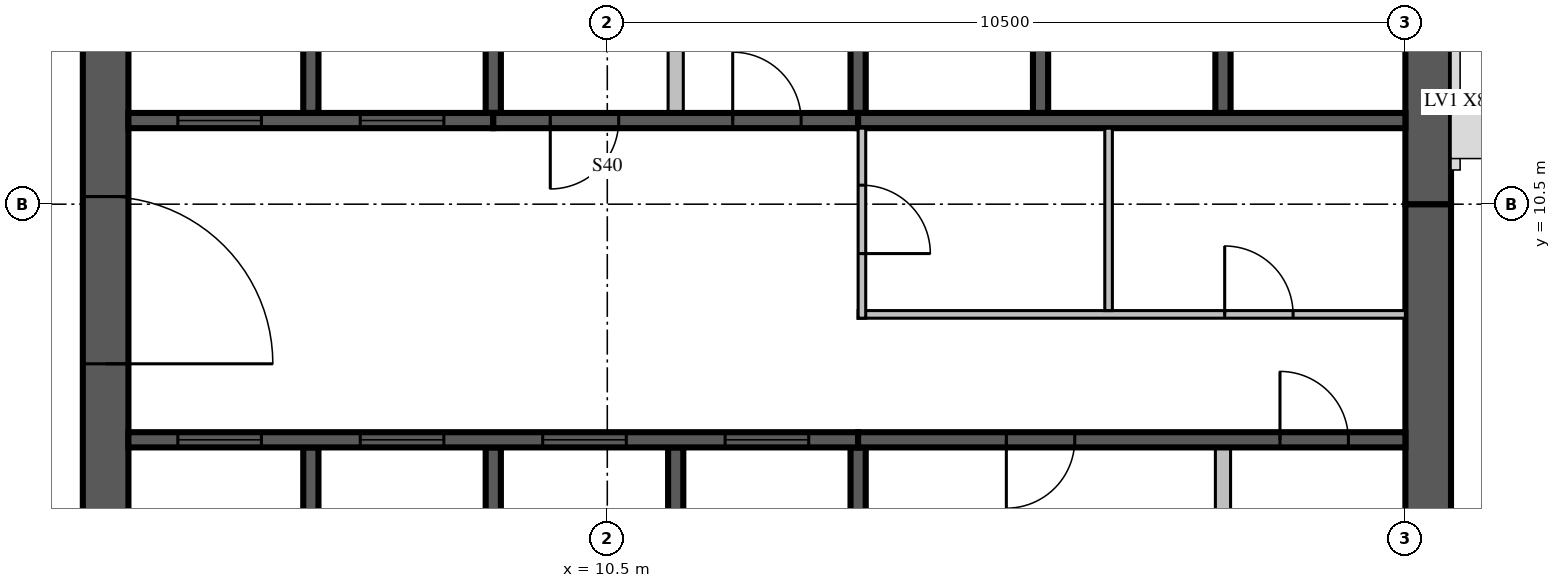
"""IFC4 building model, lengths in metres.
Left out: names, types, materials, properties, quantities, classifications, styles, units other than length and angle.
Written with IfcOpenShell. Run it as: python <this file> out.ifc"""

import sys

from ifc_helpers import new_model, si_unit, direction, frame, frame_2d, origin, place, context, subcontext, project, spatial, rectangle, extrude, source, transform, mapped, element, fill, save


model = new_model("IFC4")
c1 = context("Model", 3, precision=1e-05, world=origin(), true_north=direction((0.0, 1.0)))
c2 = subcontext(c1, "Body", "Model", "MODEL_VIEW")
j1 = project(units=[si_unit("LENGTHUNIT", "METRE"), si_unit("PLANEANGLEUNIT", "RADIAN")], contexts=[c1])
p1 = place(None, origin())
s1 = spatial("IfcSite", under=j1, at=p1, CompositionType="ELEMENT")
p2 = place(p1, origin())
s2 = spatial("IfcBuilding", under=s1, at=p2, CompositionType="ELEMENT")
p3 = place(p2, frame((0.0, 0.0, 298.5)))
s3 = spatial("IfcBuildingStorey", under=s2, at=p3, CompositionType="ELEMENT", Elevation=298.5)
m1 = source(origin(), c2, "Body", "SweptSolid", [
    extrude(rectangle(XDim=17.4, YDim=0.6, at=frame_2d((8.7, 0.0))), origin(), (0.0, 0.0, 1.0), 3.5),
])
p4 = place(p3, frame((3.9, 4.2, 0.0), z_axis=(0.0, 0.0, 1.0), x_axis=(0.0, 1.0, 0.0)))
e1 = element("IfcWall", 1, at=p4, inside=s3, PredefinedType="SHEAR", context=c2, shape_type="MappedRepresentation", body=[
    mapped(m1, transform((0.0, 0.0, 0.0), scale=1.0)),
])
m2 = source(origin(), c2, "Body", "SweptSolid", [
    extrude(rectangle(XDim=2.2, YDim=2.1, at=frame_2d((1.1, 1.05))), frame((0.0, 0.31, 0.0), z_axis=(0.0, -1.0, 0.0), x_axis=(1.0, 0.0, 0.0)), (0.0, 0.0, 1.0), 0.62),
])
p5 = place(p4, frame((4.2, 0.0, 0.0)))
e2 = element("IfcOpeningElement", 2, at=p5, cuts=e1, PredefinedType="OPENING", context=c2, shape_type="MappedRepresentation", body=[
    mapped(m2, transform((0.0, 0.0, 0.0), scale=1.0)),
])
m3 = source(origin(), c2, "Body", "SweptSolid", [
    extrude(rectangle(XDim=0.9, YDim=2.1, at=frame_2d((0.45, 1.05))), frame((0.0, 0.31, 0.0), z_axis=(0.0, -1.0, 0.0), x_axis=(1.0, 0.0, 0.0)), (0.0, 0.0, 1.0), 0.62),
])
p6 = place(p4, frame((10.95, 0.0, 0.0)))
e3 = element("IfcOpeningElement", 3, at=p6, cuts=e1, PredefinedType="OPENING", context=c2, shape_type="MappedRepresentation", body=[
    mapped(m3, transform((0.0, 0.0, 0.0), scale=1.0)),
])
m4 = source(origin(), c2, "Body", "SweptSolid", [
    extrude(rectangle(XDim=6.3, YDim=0.6, at=frame_2d((3.15, 0.0))), origin(), (0.0, 0.0, 1.0), 3.5),
])
p7 = place(p3, frame((21.3, 4.2, 0.0), z_axis=(0.0, 0.0, 1.0), x_axis=(0.0, 1.0, 0.0)))
e4 = element("IfcWall", 4, at=p7, inside=s3, PredefinedType="SHEAR", context=c2, shape_type="MappedRepresentation", body=[
    mapped(m4, transform((0.0, 0.0, 0.0), scale=1.0)),
])
m5 = source(origin(), c2, "Body", "SweptSolid", [
    extrude(rectangle(XDim=10.5, YDim=0.6, at=frame_2d((5.25, 0.0))), origin(), (0.0, 0.0, 1.0), 3.5),
])
p8 = place(p3, frame((21.3, 10.5, 0.0), z_axis=(0.0, 0.0, 1.0), x_axis=(0.0, 1.0, 0.0)))
e5 = element("IfcWall", 5, at=p8, inside=s3, PredefinedType="SHEAR", context=c2, shape_type="MappedRepresentation", body=[
    mapped(m5, transform((0.0, 0.0, 0.0), scale=1.0)),
])
m6 = source(origin(), c2, "Body", "SweptSolid", [
    extrude(rectangle(XDim=1.2, YDim=2.4, at=frame_2d((0.6, 1.2))), frame((0.0, 0.31, 0.0), z_axis=(0.0, -1.0, 0.0), x_axis=(1.0, 0.0, 0.0)), (0.0, 0.0, 1.0), 0.62),
])
p9 = place(p8, frame((5.7, 0.0, 0.6)))
e6 = element("IfcOpeningElement", 6, at=p9, cuts=e5, PredefinedType="OPENING", context=c2, shape_type="MappedRepresentation", body=[
    mapped(m6, transform((0.0, 0.0, 0.0), scale=1.0)),
])
m7 = source(origin(), c2, "Body", "SweptSolid", [
    extrude(rectangle(XDim=3.1, YDim=0.2, at=frame_2d((1.55, 0.0))), origin(), (0.0, 0.0, 1.0), 3.5),
])
for number, where, z_axis, x_axis in (
    (7, (6.6, 4.2, 0.0), (0.0, 0.0, 1.0), (0.0, 1.0, 0.0)),
    (8, (9.0, 4.2, 0.0), (0.0, 0.0, 1.0), (0.0, 1.0, 0.0)),
    (9, (11.4, 4.2, 0.0), (0.0, 0.0, 1.0), (0.0, 1.0, 0.0)),
):
    element("IfcWall", number, at=place(p3, frame(where, z_axis=z_axis, x_axis=x_axis)), inside=s3, PredefinedType="SOLIDWALL", context=c2, shape_type="MappedRepresentation", body=[
        mapped(m7, transform((0.0, 0.0, 0.0), scale=1.0)),
    ])
m8 = source(origin(), c2, "Body", "SweptSolid", [
    extrude(rectangle(XDim=3.1, YDim=0.2, at=frame_2d((1.55, 0.0))), origin(), (0.0, 0.0, 1.0), 3.1),
])
p10 = place(p3, frame((13.8, 4.2, 0.0), z_axis=(0.0, 0.0, 1.0), x_axis=(0.0, 1.0, 0.0)))
e10 = element("IfcWall", 10, at=p10, inside=s3, PredefinedType="SOLIDWALL", context=c2, shape_type="MappedRepresentation", body=[
    mapped(m8, transform((0.0, 0.0, 0.0), scale=1.0)),
])
m9 = source(origin(), c2, "Body", "SweptSolid", [
    extrude(rectangle(XDim=3.1, YDim=0.2, at=frame_2d((1.55, 0.0))), origin(), (0.0, 0.0, 1.0), 3.1),
])
p11 = place(p3, frame((18.6, 4.2, 0.0), z_axis=(0.0, 0.0, 1.0), x_axis=(0.0, 1.0, 0.0)))
e11 = element("IfcWall", 11, at=p11, inside=s3, PredefinedType="PARTITIONING", context=c2, shape_type="MappedRepresentation", body=[
    mapped(m9, transform((0.0, 0.0, 0.0), scale=1.0)),
])
m10 = source(origin(), c2, "Body", "SweptSolid", [
    extrude(rectangle(XDim=3.0, YDim=0.2, at=frame_2d((1.5, 0.0))), origin(), (0.0, 0.0, 1.0), 3.5),
])
p12 = place(p3, frame((6.6, 11.7, 0.0), z_axis=(0.0, 0.0, 1.0), x_axis=(0.0, 1.0, 0.0)))
e12 = element("IfcWall", 12, at=p12, inside=s3, PredefinedType="SOLIDWALL", context=c2, shape_type="MappedRepresentation", body=[
    mapped(m10, transform((0.0, 0.0, 0.0), scale=1.0)),
])
m11 = source(origin(), c2, "Body", "SweptSolid", [
    extrude(rectangle(XDim=3.0, YDim=0.2, at=frame_2d((1.5, 0.0))), origin(), (0.0, 0.0, 1.0), 3.1),
])
for number, where, z_axis, x_axis in (
    (13, (9.0, 11.7, 0.0), (0.0, 0.0, 1.0), (0.0, 1.0, 0.0)),
    (14, (13.8, 11.7, 0.0), (0.0, 0.0, 1.0), (0.0, 1.0, 0.0)),
):
    element("IfcWall", number, at=place(p3, frame(where, z_axis=z_axis, x_axis=x_axis)), inside=s3, PredefinedType="SOLIDWALL", context=c2, shape_type="MappedRepresentation", body=[
        mapped(m11, transform((0.0, 0.0, 0.0), scale=1.0)),
    ])
for number, where, z_axis, x_axis in (
    (15, (16.2, 11.7, 0.0), (0.0, 0.0, 1.0), (0.0, 1.0, 0.0)),
    (16, (18.6, 11.7, 0.0), (0.0, 0.0, 1.0), (0.0, 1.0, 0.0)),
):
    element("IfcWall", number, at=place(p3, frame(where, z_axis=z_axis, x_axis=x_axis)), inside=s3, PredefinedType="SOLIDWALL", context=c2, shape_type="MappedRepresentation", body=[
        mapped(m10, transform((0.0, 0.0, 0.0), scale=1.0)),
    ])
m12 = source(origin(), c2, "Body", "SweptSolid", [
    extrude(rectangle(XDim=3.0, YDim=0.2, at=frame_2d((1.5, 0.0))), origin(), (0.0, 0.0, 1.0), 3.1),
])
p13 = place(p3, frame((11.4, 11.7, 0.0), z_axis=(0.0, 0.0, 1.0), x_axis=(0.0, 1.0, 0.0)))
e17 = element("IfcWall", 17, at=p13, inside=s3, PredefinedType="PARTITIONING", context=c2, shape_type="MappedRepresentation", body=[
    mapped(m12, transform((0.0, 0.0, 0.0), scale=1.0)),
])
m13 = source(origin(), c2, "Body", "SweptSolid", [
    extrude(rectangle(XDim=9.6, YDim=0.2, at=frame_2d((4.8, 0.0))), origin(), (0.0, 0.0, 1.0), 3.5),
])
p14 = place(p3, frame((4.2, 7.4, 0.0), z_axis=(0.0, 0.0, 1.0), x_axis=(1.0, 0.0, 0.0)))
e18 = element("IfcWall", 18, at=p14, inside=s3, PredefinedType="SOLIDWALL", context=c2, shape_type="MappedRepresentation", body=[
    mapped(m13, transform((0.0, 0.0, 0.0), scale=1.0)),
])
m14 = source(origin(), c2, "Body", "SweptSolid", [
    extrude(rectangle(XDim=1.1, YDim=2.1, at=frame_2d((0.55, 1.05))), frame((0.0, 0.11, 0.0), z_axis=(0.0, -1.0, 0.0), x_axis=(1.0, 0.0, 0.0)), (0.0, 0.0, 1.0), 0.22),
])
p15 = place(p14, frame((0.65, 0.0, 0.0)))
e19 = element("IfcOpeningElement", 19, at=p15, cuts=e18, PredefinedType="OPENING", context=c2, shape_type="MappedRepresentation", body=[
    mapped(m14, transform((0.0, 0.0, 0.0), scale=1.0)),
])
p16 = place(p14, frame((3.05, 0.0, 0.0)))
e20 = element("IfcOpeningElement", 20, at=p16, cuts=e18, PredefinedType="OPENING", context=c2, shape_type="MappedRepresentation", body=[
    mapped(m14, transform((0.0, 0.0, 0.0), scale=1.0)),
])
p17 = place(p14, frame((5.45, 0.0, 0.0)))
e21 = element("IfcOpeningElement", 21, at=p17, cuts=e18, PredefinedType="OPENING", context=c2, shape_type="MappedRepresentation", body=[
    mapped(m14, transform((0.0, 0.0, 0.0), scale=1.0)),
])
p18 = place(p14, frame((7.85, 0.0, 0.0)))
e22 = element("IfcOpeningElement", 22, at=p18, cuts=e18, PredefinedType="OPENING", context=c2, shape_type="MappedRepresentation", body=[
    mapped(m14, transform((0.0, 0.0, 0.0), scale=1.0)),
])
m15 = source(origin(), c2, "Body", "SweptSolid", [
    extrude(rectangle(XDim=7.2, YDim=0.2, at=frame_2d((3.6, 0.0))), origin(), (0.0, 0.0, 1.0), 3.1),
])
p19 = place(p3, frame((13.8, 7.4, 0.0), z_axis=(0.0, 0.0, 1.0), x_axis=(1.0, 0.0, 0.0)))
e23 = element("IfcWall", 23, at=p19, inside=s3, PredefinedType="SOLIDWALL", context=c2, shape_type="MappedRepresentation", body=[
    mapped(m15, transform((0.0, 0.0, 0.0), scale=1.0)),
])
m16 = source(origin(), c2, "Body", "SweptSolid", [
    extrude(rectangle(XDim=0.9, YDim=2.1, at=frame_2d((0.45, 1.05))), frame((0.0, 0.11, 0.0), z_axis=(0.0, -1.0, 0.0), x_axis=(1.0, 0.0, 0.0)), (0.0, 0.0, 1.0), 0.22),
])
p20 = place(p19, frame((1.95, 0.0, 0.0)))
e24 = element("IfcOpeningElement", 24, at=p20, cuts=e23, PredefinedType="OPENING", context=c2, shape_type="MappedRepresentation", body=[
    mapped(m16, transform((0.0, 0.0, 0.0), scale=1.0)),
])
p21 = place(p19, frame((5.55, 0.0, 0.0)))
e25 = element("IfcOpeningElement", 25, at=p21, cuts=e23, PredefinedType="OPENING", context=c2, shape_type="MappedRepresentation", body=[
    mapped(m16, transform((0.0, 0.0, 0.0), scale=1.0)),
])
m17 = source(origin(), c2, "Body", "SweptSolid", [
    extrude(rectangle(XDim=4.8, YDim=0.2, at=frame_2d((2.4, 0.0))), origin(), (0.0, 0.0, 1.0), 3.5),
])
p22 = place(p3, frame((4.2, 11.6, 0.0), z_axis=(0.0, 0.0, 1.0), x_axis=(1.0, 0.0, 0.0)))
e26 = element("IfcWall", 26, at=p22, inside=s3, PredefinedType="SOLIDWALL", context=c2, shape_type="MappedRepresentation", body=[
    mapped(m17, transform((0.0, 0.0, 0.0), scale=1.0)),
])
p23 = place(p22, frame((0.65, 0.0, 0.0)))
e27 = element("IfcOpeningElement", 27, at=p23, cuts=e26, PredefinedType="OPENING", context=c2, shape_type="MappedRepresentation", body=[
    mapped(m14, transform((0.0, 0.0, 0.0), scale=1.0)),
])
p24 = place(p22, frame((3.05, 0.0, 0.0)))
e28 = element("IfcOpeningElement", 28, at=p24, cuts=e26, PredefinedType="OPENING", context=c2, shape_type="MappedRepresentation", body=[
    mapped(m14, transform((0.0, 0.0, 0.0), scale=1.0)),
])
m18 = source(origin(), c2, "Body", "SweptSolid", [
    extrude(rectangle(XDim=4.8, YDim=0.2, at=frame_2d((2.4, 0.0))), origin(), (0.0, 0.0, 1.0), 3.1),
])
p25 = place(p3, frame((9.0, 11.6, 0.0), z_axis=(0.0, 0.0, 1.0), x_axis=(1.0, 0.0, 0.0)))
e29 = element("IfcWall", 29, at=p25, inside=s3, PredefinedType="SOLIDWALL", context=c2, shape_type="MappedRepresentation", body=[
    mapped(m18, transform((0.0, 0.0, 0.0), scale=1.0)),
])
p26 = place(p25, frame((0.75, 0.0, 0.0)))
e30 = element("IfcOpeningElement", 30, at=p26, cuts=e29, PredefinedType="OPENING", context=c2, shape_type="MappedRepresentation", body=[
    mapped(m16, transform((0.0, 0.0, 0.0), scale=1.0)),
])
p27 = place(p25, frame((3.15, 0.0, 0.0)))
e31 = element("IfcOpeningElement", 31, at=p27, cuts=e29, PredefinedType="OPENING", context=c2, shape_type="MappedRepresentation", body=[
    mapped(m16, transform((0.0, 0.0, 0.0), scale=1.0)),
])
m19 = source(origin(), c2, "Body", "SweptSolid", [
    extrude(rectangle(XDim=7.2, YDim=0.2, at=frame_2d((3.6, 0.0))), origin(), (0.0, 0.0, 1.0), 3.5),
])
p28 = place(p3, frame((13.8, 11.6, 0.0), z_axis=(0.0, 0.0, 1.0), x_axis=(1.0, 0.0, 0.0)))
e32 = element("IfcWall", 32, at=p28, inside=s3, PredefinedType="SOLIDWALL", context=c2, shape_type="MappedRepresentation", body=[
    mapped(m19, transform((0.0, 0.0, 0.0), scale=1.0)),
])
m20 = source(origin(), c2, "Body", "SweptSolid", [
    extrude(rectangle(XDim=7.2, YDim=0.1, at=frame_2d((3.6, 0.0))), origin(), (0.0, 0.0, 1.0), 3.1),
])
p29 = place(p3, frame((13.8, 9.05, 0.0), z_axis=(0.0, 0.0, 1.0), x_axis=(1.0, 0.0, 0.0)))
e33 = element("IfcWall", 33, at=p29, inside=s3, PredefinedType="PARTITIONING", context=c2, shape_type="MappedRepresentation", body=[
    mapped(m20, transform((0.0, 0.0, 0.0), scale=1.0)),
])
m21 = source(origin(), c2, "Body", "SweptSolid", [
    extrude(rectangle(XDim=0.9, YDim=2.1, at=frame_2d((0.45, 1.05))), frame((0.0, 0.06, 0.0), z_axis=(0.0, -1.0, 0.0), x_axis=(1.0, 0.0, 0.0)), (0.0, 0.0, 1.0), 0.12),
])
p30 = place(p29, frame((4.822, 0.0, 0.0)))
e34 = element("IfcOpeningElement", 34, at=p30, cuts=e33, PredefinedType="OPENING", context=c2, shape_type="MappedRepresentation", body=[
    mapped(m21, transform((0.0, 0.0, 0.0), scale=1.0)),
])
m22 = source(origin(), c2, "Body", "SweptSolid", [
    extrude(rectangle(XDim=2.5, YDim=0.1, at=frame_2d((1.25, 0.0))), origin(), (0.0, 0.0, 1.0), 3.1),
])
p31 = place(p3, frame((13.85, 9.0, 0.0), z_axis=(0.0, 0.0, 1.0), x_axis=(0.0, 1.0, 0.0)))
e35 = element("IfcWall", 35, at=p31, inside=s3, PredefinedType="PARTITIONING", context=c2, shape_type="MappedRepresentation", body=[
    mapped(m22, transform((0.0, 0.0, 0.0), scale=1.0)),
])
p32 = place(p31, frame((0.85, 0.0, 0.0)))
e36 = element("IfcOpeningElement", 36, at=p32, cuts=e35, PredefinedType="OPENING", context=c2, shape_type="MappedRepresentation", body=[
    mapped(m21, transform((0.0, 0.0, 0.0), scale=1.0)),
])
m23 = source(origin(), c2, "Body", "SweptSolid", [
    extrude(rectangle(XDim=2.4, YDim=0.1, at=frame_2d((1.2, 0.0))), origin(), (0.0, 0.0, 1.0), 3.1),
])
p33 = place(p3, frame((17.095, 9.1, 0.0), z_axis=(0.0, 0.0, 1.0), x_axis=(0.0, 1.0, 0.0)))
e37 = element("IfcWall", 37, at=p33, inside=s3, PredefinedType="PARTITIONING", context=c2, shape_type="MappedRepresentation", body=[
    mapped(m23, transform((0.0, 0.0, 0.0), scale=1.0)),
])
m24 = source(origin(), c2, "Body", "SweptSolid", [
    extrude(rectangle(XDim=1.1, YDim=2.1, at=frame_2d((0.55, 1.05))), frame((0.0, 0.025, 0.0), z_axis=(0.0, -1.0, 0.0), x_axis=(1.0, 0.0, 0.0)), (0.0, 0.0, 1.0), 0.05),
])
p34 = place(p15, origin())
e38 = element("IfcDoor", 38, at=p34, inside=s3, OperationType="SLIDING_TO_LEFT", PredefinedType="DOOR", context=c2, shape_type="MappedRepresentation", body=[
    mapped(m24, transform((0.0, 0.0, 0.0), scale=1.0)),
])
fill(e19, e38)
p35 = place(p16, origin())
e39 = element("IfcDoor", 39, at=p35, inside=s3, OperationType="SLIDING_TO_LEFT", PredefinedType="DOOR", context=c2, shape_type="MappedRepresentation", body=[
    mapped(m24, transform((0.0, 0.0, 0.0), scale=1.0)),
])
fill(e20, e39)
p36 = place(p17, origin())
e40 = element("IfcDoor", 40, at=p36, inside=s3, OperationType="SLIDING_TO_LEFT", PredefinedType="DOOR", context=c2, shape_type="MappedRepresentation", body=[
    mapped(m24, transform((0.0, 0.0, 0.0), scale=1.0)),
])
fill(e21, e40)
p37 = place(p18, origin())
e41 = element("IfcDoor", 41, at=p37, inside=s3, OperationType="SLIDING_TO_LEFT", PredefinedType="DOOR", context=c2, shape_type="MappedRepresentation", body=[
    mapped(m24, transform((0.0, 0.0, 0.0), scale=1.0)),
])
fill(e22, e41)
m25 = source(origin(), c2, "Body", "SweptSolid", [
    extrude(rectangle(XDim=0.9, YDim=2.1, at=frame_2d((0.45, 1.05))), frame((0.0, 0.025, 0.0), z_axis=(0.0, -1.0, 0.0), x_axis=(1.0, 0.0, 0.0)), (0.0, 0.0, 1.0), 0.05),
])
p38 = place(p20, origin())
e42 = element("IfcDoor", 42, at=p38, inside=s3, OperationType="SINGLE_SWING_RIGHT", PredefinedType="DOOR", context=c2, shape_type="MappedRepresentation", body=[
    mapped(m25, transform((0.0, 0.0, 0.0), scale=1.0)),
])
fill(e24, e42)
p39 = place(p21, origin())
e43 = element("IfcDoor", 43, at=p39, inside=s3, OperationType="SINGLE_SWING_LEFT", PredefinedType="DOOR", context=c2, shape_type="MappedRepresentation", body=[
    mapped(m25, transform((0.0, 0.0, 0.0), scale=1.0)),
])
fill(e25, e43)
p40 = place(p23, origin())
e44 = element("IfcDoor", 44, at=p40, inside=s3, OperationType="SLIDING_TO_LEFT", PredefinedType="DOOR", context=c2, shape_type="MappedRepresentation", body=[
    mapped(m24, transform((0.0, 0.0, 0.0), scale=1.0)),
])
fill(e27, e44)
p41 = place(p24, origin())
e45 = element("IfcDoor", 45, at=p41, inside=s3, OperationType="SLIDING_TO_LEFT", PredefinedType="DOOR", context=c2, shape_type="MappedRepresentation", body=[
    mapped(m24, transform((0.0, 0.0, 0.0), scale=1.0)),
])
fill(e28, e45)
p42 = place(p26, origin())
e46 = element("IfcDoor", 46, at=p42, inside=s3, OperationType="SINGLE_SWING_RIGHT", PredefinedType="DOOR", context=c2, shape_type="MappedRepresentation", body=[
    mapped(m25, transform((0.0, 0.0, 0.0), scale=1.0)),
])
fill(e30, e46)
p43 = place(p27, origin())
e47 = element("IfcDoor", 47, at=p43, inside=s3, OperationType="SINGLE_SWING_LEFT", PredefinedType="DOOR", context=c2, shape_type="MappedRepresentation", body=[
    mapped(m25, transform((0.0, 0.0, 0.0), scale=1.0)),
])
fill(e31, e47)
p44 = place(p30, origin())
e48 = element("IfcDoor", 48, at=p44, inside=s3, OperationType="SINGLE_SWING_LEFT", PredefinedType="DOOR", context=c2, shape_type="MappedRepresentation", body=[
    mapped(m25, transform((0.0, 0.0, 0.0), scale=1.0)),
])
fill(e34, e48)
p45 = place(p32, origin())
e49 = element("IfcDoor", 49, at=p45, inside=s3, OperationType="SINGLE_SWING_RIGHT", PredefinedType="DOOR", context=c2, shape_type="MappedRepresentation", body=[
    mapped(m25, transform((0.0, 0.0, 0.0), scale=1.0)),
])
fill(e36, e49)
m26 = source(origin(), c2, "Body", "SweptSolid", [
    extrude(rectangle(XDim=2.2, YDim=2.1, at=frame_2d((1.1, 1.05))), frame((0.0, 0.025, 0.0), z_axis=(0.0, -1.0, 0.0), x_axis=(1.0, 0.0, 0.0)), (0.0, 0.0, 1.0), 0.05),
])
p46 = place(p5, origin())
e50 = element("IfcDoor", 50, at=p46, inside=s3, OperationType="DOUBLE_DOOR_SINGLE_SWING", PredefinedType="DOOR", context=c2, shape_type="MappedRepresentation", body=[
    mapped(m26, transform((0.0, 0.0, 0.0), scale=1.0)),
])
fill(e2, e50)
save(model, sys.argv[1])
